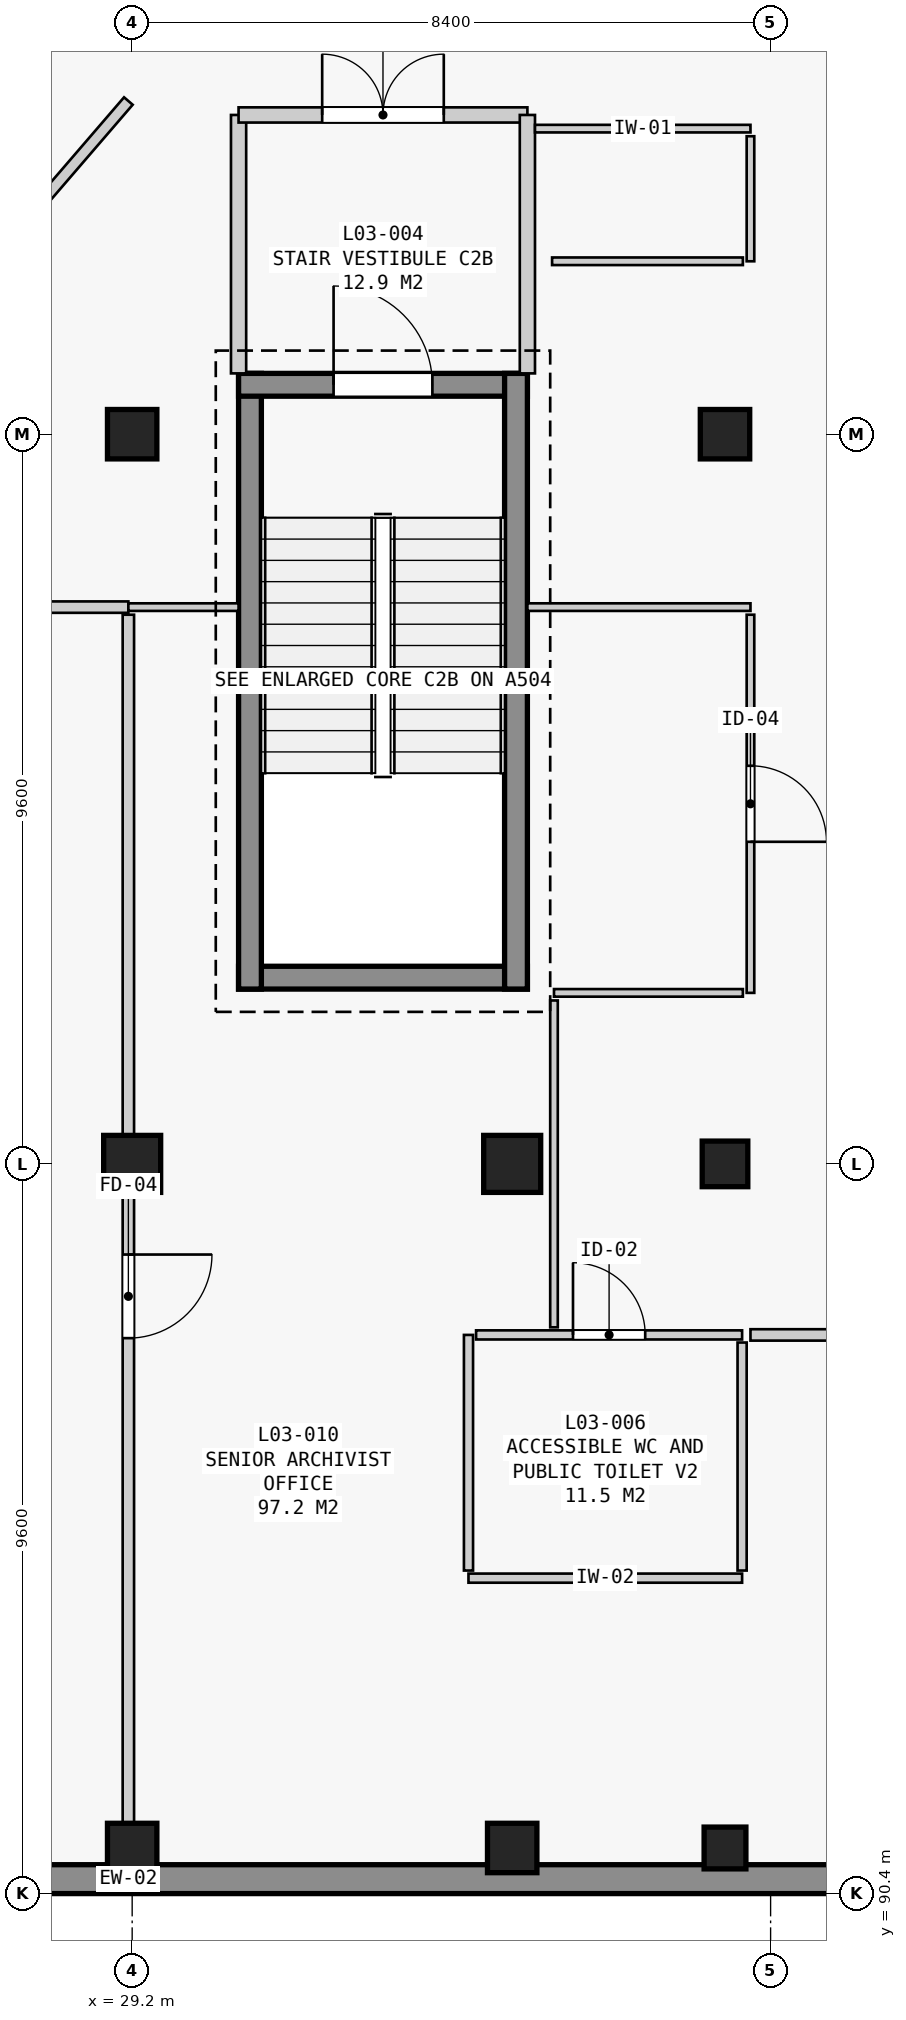
"""IFC4 building model, lengths in metres.
Left out: names, types, materials, properties, quantities, classifications, styles, units other than length and angle.
Written with IfcOpenShell. Run it as: python <this file> out.ifc"""

import sys

from ifc_helpers import new_model, si_unit, direction, frame, frame_2d, origin, origin_2d, place, context, subcontext, project, spatial, rectangle, extrude, element, fill, save


model = new_model("IFC4")
c1 = context("Model", 3, precision=1e-05, world=origin(), true_north=direction((0.0, 1.0)))
c2 = subcontext(c1, "Body", "Model", "MODEL_VIEW")
j1 = project(units=[si_unit("LENGTHUNIT", "METRE"), si_unit("PLANEANGLEUNIT", "RADIAN")], contexts=[c1])
p1 = place(None, origin())
s1 = spatial("IfcSite", under=j1, at=p1, CompositionType="ELEMENT")
p2 = place(p1, origin())
s2 = spatial("IfcBuilding", under=s1, at=p2, CompositionType="ELEMENT")
p3 = place(p2, frame((0.0, 0.0, 13.8)))
s3 = spatial("IfcBuildingStorey", under=s2, at=p3, CompositionType="ELEMENT", Elevation=13.8)
p4 = place(p3, frame((29.2, 91.0, 0.0), z_axis=(0.0, 0.0, 1.0), x_axis=(1.0, 0.0, 0.0)))
e1 = element("IfcColumn", 1, at=p4, inside=s3, PredefinedType="COLUMN", context=c2, shape_type="SweptSolid", body=[
    extrude(rectangle(XDim=0.65, YDim=0.65, at=origin_2d()), origin(), (0.0, 0.0, 1.0), 4.5),
])
p5 = place(p3, frame((29.2, 100.0, 0.0), z_axis=(0.0, 0.0, 1.0), x_axis=(1.0, 0.0, 0.0)))
e2 = element("IfcColumn", 2, at=p5, inside=s3, PredefinedType="COLUMN", context=c2, shape_type="SweptSolid", body=[
    extrude(rectangle(XDim=0.75, YDim=0.75, at=origin_2d()), origin(), (0.0, 0.0, 1.0), 4.5),
])
for number, where, z_axis, x_axis in (
    (3, (29.2, 109.6, 0.0), (0.0, 0.0, 1.0), (1.0, 0.0, 0.0)),
    (4, (34.2, 91.0, 0.0), (0.0, 0.0, 1.0), (1.0, 0.0, 0.0)),
):
    element("IfcColumn", number, at=place(p3, frame(where, z_axis=z_axis, x_axis=x_axis)), inside=s3, PredefinedType="COLUMN", context=c2, shape_type="SweptSolid", body=[
        extrude(rectangle(XDim=0.65, YDim=0.65, at=origin_2d()), origin(), (0.0, 0.0, 1.0), 4.5),
    ])
p6 = place(p3, frame((34.2, 100.0, 0.0), z_axis=(0.0, 0.0, 1.0), x_axis=(1.0, 0.0, 0.0)))
e5 = element("IfcColumn", 5, at=p6, inside=s3, PredefinedType="COLUMN", context=c2, shape_type="SweptSolid", body=[
    extrude(rectangle(XDim=0.75, YDim=0.75, at=origin_2d()), origin(), (0.0, 0.0, 1.0), 4.5),
])
p7 = place(p3, frame((37.0, 91.0, 0.0), z_axis=(0.0, 0.0, 1.0), x_axis=(1.0, 0.0, 0.0)))
e6 = element("IfcColumn", 6, at=p7, inside=s3, PredefinedType="COLUMN", context=c2, shape_type="SweptSolid", body=[
    extrude(rectangle(XDim=0.55, YDim=0.55, at=origin_2d()), origin(), (0.0, 0.0, 1.0), 4.5),
])
p8 = place(p3, frame((37.0, 100.0, 0.0), z_axis=(0.0, 0.0, 1.0), x_axis=(1.0, 0.0, 0.0)))
e7 = element("IfcColumn", 7, at=p8, inside=s3, PredefinedType="COLUMN", context=c2, shape_type="SweptSolid", body=[
    extrude(rectangle(XDim=0.6, YDim=0.6, at=origin_2d()), origin(), (0.0, 0.0, 1.0), 4.5),
])
p9 = place(p3, frame((37.0, 109.6, 0.0), z_axis=(0.0, 0.0, 1.0), x_axis=(1.0, 0.0, 0.0)))
e8 = element("IfcColumn", 8, at=p9, inside=s3, PredefinedType="COLUMN", context=c2, shape_type="SweptSolid", body=[
    extrude(rectangle(XDim=0.65, YDim=0.65, at=origin_2d()), origin(), (0.0, 0.0, 1.0), 4.5),
])
p10 = place(p3, frame((45.71, 90.59, 0.0), z_axis=(0.0, 0.0, 1.0), x_axis=(-1.0, 0.0, 0.0)))
e9 = element("IfcWall", 9, at=p10, inside=s3, PredefinedType="STANDARD", context=c2, shape_type="SweptSolid", body=[
    extrude(rectangle(XDim=33.12, YDim=0.38, at=frame_2d((16.56, 0.0))), origin(), (0.0, 0.0, 1.0), 4.18),
])
p11 = place(p3, frame((34.4, 102.45, 0.0), z_axis=(0.0, 0.0, 1.0), x_axis=(-1.0, 0.0, 0.0)))
e10 = element("IfcWall", 10, at=p11, inside=s3, PredefinedType="SHEAR", context=c2, shape_type="SweptSolid", body=[
    extrude(rectangle(XDim=3.8, YDim=0.3, at=frame_2d((1.9, 0.0))), origin(), (0.0, 0.0, 1.0), 4.18),
])
p12 = place(p3, frame((30.75, 102.3, 0.0), z_axis=(0.0, 0.0, 1.0), x_axis=(0.0, 1.0, 0.0)))
e11 = element("IfcWall", 11, at=p12, inside=s3, PredefinedType="SHEAR", context=c2, shape_type="SweptSolid", body=[
    extrude(rectangle(XDim=8.1, YDim=0.3, at=frame_2d((4.05, 0.0))), origin(), (0.0, 0.0, 1.0), 4.18),
])
p13 = place(p3, frame((30.6, 110.25, 0.0), z_axis=(0.0, 0.0, 1.0), x_axis=(1.0, 0.0, 0.0)))
e12 = element("IfcWall", 12, at=p13, inside=s3, PredefinedType="SHEAR", context=c2, shape_type="SweptSolid", body=[
    extrude(rectangle(XDim=3.8, YDim=0.3, at=frame_2d((1.9, 0.0))), origin(), (0.0, 0.0, 1.0), 4.18),
])
p14 = place(p13, frame((1.25, 0.0, 0.0)))
e13 = element("IfcOpeningElement", 13, at=p14, cuts=e12, PredefinedType="OPENING", context=c2, shape_type="SweptSolid", body=[
    extrude(rectangle(XDim=1.3, YDim=2.2, at=frame_2d((0.65, 1.1))), frame((0.0, 0.16, 0.0), z_axis=(0.0, -1.0, 0.0), x_axis=(1.0, 0.0, 0.0)), (0.0, 0.0, 1.0), 0.32),
])
p15 = place(p3, frame((34.25, 110.4, 0.0), z_axis=(0.0, 0.0, 1.0), x_axis=(0.0, -1.0, 0.0)))
e14 = element("IfcWall", 14, at=p15, inside=s3, PredefinedType="SHEAR", context=c2, shape_type="SweptSolid", body=[
    extrude(rectangle(XDim=8.1, YDim=0.3, at=frame_2d((4.05, 0.0))), origin(), (0.0, 0.0, 1.0), 4.18),
])
p16 = place(p3, frame((30.6, 110.4, 0.0), z_axis=(0.0, 0.0, 1.0), x_axis=(0.0, 1.0, 0.0)))
e15 = element("IfcWall", 15, at=p16, inside=s3, PredefinedType="STANDARD", context=c2, shape_type="SweptSolid", body=[
    extrude(rectangle(XDim=3.4, YDim=0.2, at=frame_2d((1.7, 0.0))), origin(), (0.0, 0.0, 1.0), 4.18),
])
p17 = place(p3, frame((30.6, 113.8, 0.0), z_axis=(0.0, 0.0, 1.0), x_axis=(1.0, 0.0, 0.0)))
e16 = element("IfcWall", 16, at=p17, inside=s3, PredefinedType="STANDARD", context=c2, shape_type="SweptSolid", body=[
    extrude(rectangle(XDim=3.8, YDim=0.2, at=frame_2d((1.9, 0.0))), origin(), (0.0, 0.0, 1.0), 4.18),
])
p18 = place(p17, frame((1.1, 0.0, 0.0)))
e17 = element("IfcOpeningElement", 17, at=p18, cuts=e16, PredefinedType="OPENING", context=c2, shape_type="SweptSolid", body=[
    extrude(rectangle(XDim=1.6, YDim=2.2, at=frame_2d((0.8, 1.1))), frame((0.0, 0.11, 0.0), z_axis=(0.0, -1.0, 0.0), x_axis=(1.0, 0.0, 0.0)), (0.0, 0.0, 1.0), 0.22),
])
p19 = place(p3, frame((34.4, 113.8, 0.0), z_axis=(0.0, 0.0, 1.0), x_axis=(0.0, -1.0, 0.0)))
e18 = element("IfcWall", 18, at=p19, inside=s3, PredefinedType="STANDARD", context=c2, shape_type="SweptSolid", body=[
    extrude(rectangle(XDim=3.4, YDim=0.2, at=frame_2d((1.7, 0.0))), origin(), (0.0, 0.0, 1.0), 4.18),
])
p20 = place(p3, frame((37.225, 94.55, 0.0), z_axis=(0.0, 0.0, 1.0), x_axis=(-1.0, 0.0, 0.0)))
e19 = element("IfcWall", 19, at=p20, inside=s3, PredefinedType="PARTITIONING", context=c2, shape_type="SweptSolid", body=[
    extrude(rectangle(XDim=3.6, YDim=0.12, at=frame_2d((1.8, 0.0))), origin(), (0.0, 0.0, 1.0), 3.36),
])
p21 = place(p3, frame((33.625, 94.65, 0.0), z_axis=(0.0, 0.0, 1.0), x_axis=(0.0, 1.0, 0.0)))
e20 = element("IfcWall", 20, at=p21, inside=s3, PredefinedType="PARTITIONING", context=c2, shape_type="SweptSolid", body=[
    extrude(rectangle(XDim=3.1, YDim=0.12, at=frame_2d((1.55, 0.0))), origin(), (0.0, 0.0, 1.0), 4.18),
])
p22 = place(p3, frame((33.725, 97.75, 0.0), z_axis=(0.0, 0.0, 1.0), x_axis=(1.0, 0.0, 0.0)))
e21 = element("IfcWall", 21, at=p22, inside=s3, PredefinedType="PARTITIONING", context=c2, shape_type="SweptSolid", body=[
    extrude(rectangle(XDim=3.5, YDim=0.12, at=frame_2d((1.75, 0.0))), origin(), (0.0, 0.0, 1.0), 3.36),
])
p23 = place(p22, frame((1.275, 0.0, 0.0)))
e22 = element("IfcOpeningElement", 22, at=p23, cuts=e21, PredefinedType="OPENING", context=c2, shape_type="SweptSolid", body=[
    extrude(rectangle(XDim=0.95, YDim=2.15, at=frame_2d((0.475, 1.075))), frame((0.0, 0.07, 0.0), z_axis=(0.0, -1.0, 0.0), x_axis=(1.0, 0.0, 0.0)), (0.0, 0.0, 1.0), 0.14),
])
p24 = place(p3, frame((37.225, 97.65, 0.0), z_axis=(0.0, 0.0, 1.0), x_axis=(0.0, -1.0, 0.0)))
e23 = element("IfcWall", 23, at=p24, inside=s3, PredefinedType="PARTITIONING", context=c2, shape_type="SweptSolid", body=[
    extrude(rectangle(XDim=3.0, YDim=0.12, at=frame_2d((1.5, 0.0))), origin(), (0.0, 0.0, 1.0), 3.37),
])
p25 = place(p3, frame((27.852, 107.325, 0.0), z_axis=(0.0, 0.0, 1.0), x_axis=(1.0, 0.0, 0.0)))
e24 = element("IfcWall", 24, at=p25, inside=s3, PredefinedType="PARTITIONING", context=c2, shape_type="SweptSolid", body=[
    extrude(rectangle(XDim=1.298, YDim=0.15, at=frame_2d((0.649, 0.0))), origin(), (0.0, 0.0, 1.0), 3.46),
])
p26 = place(p3, frame((29.15, 107.225, 0.0), z_axis=(0.0, 0.0, 1.0), x_axis=(0.0, -1.0, 0.0)))
e25 = element("IfcWall", 25, at=p26, inside=s3, PredefinedType="PARTITIONING", context=c2, shape_type="SweptSolid", body=[
    extrude(rectangle(XDim=16.535, YDim=0.15, at=frame_2d((8.268, 0.0))), origin(), (0.0, 0.0, 1.0), 3.26),
])
p27 = place(p26, frame((8.417, 0.0, 0.0)))
e26 = element("IfcOpeningElement", 26, at=p27, cuts=e25, PredefinedType="OPENING", context=c2, shape_type="SweptSolid", body=[
    extrude(rectangle(XDim=1.1, YDim=2.15, at=frame_2d((0.55, 1.075))), frame((0.0, 0.085, 0.0), z_axis=(0.0, -1.0, 0.0), x_axis=(1.0, 0.0, 0.0)), (0.0, 0.0, 1.0), 0.17),
])
p28 = place(p3, frame((29.15, 113.983, 0.0), z_axis=(0.0, 0.0, 1.0), x_axis=(-0.652340430993, -0.757926092764, 0.0)))
e27 = element("IfcWall", 27, at=p28, inside=s3, PredefinedType="PARTITIONING", context=c2, shape_type="SweptSolid", body=[
    extrude(rectangle(XDim=3.411, YDim=0.15, at=frame_2d((1.705, 0.0))), origin(), (0.0, 0.0, 1.0), 3.41),
])
p29 = place(p3, frame((34.5, 113.62, 0.0), z_axis=(0.0, 0.0, 1.0), x_axis=(1.0, 0.0, 0.0)))
e28 = element("IfcWall", 28, at=p29, inside=s3, PredefinedType="PARTITIONING", context=c2, shape_type="SweptSolid", body=[
    extrude(rectangle(XDim=2.835, YDim=0.1, at=frame_2d((1.417, 0.0))), origin(), (0.0, 0.0, 1.0), 3.37),
])
p30 = place(p3, frame((37.335, 113.52, 0.0), z_axis=(0.0, 0.0, 1.0), x_axis=(0.0, -1.0, 0.0)))
e29 = element("IfcWall", 29, at=p30, inside=s3, PredefinedType="PARTITIONING", context=c2, shape_type="SweptSolid", body=[
    extrude(rectangle(XDim=1.645, YDim=0.1, at=frame_2d((0.823, 0.0))), origin(), (0.0, 0.0, 1.0), 3.37),
])
p31 = place(p3, frame((37.235, 111.875, 0.0), z_axis=(0.0, 0.0, 1.0), x_axis=(-1.0, 0.0, 0.0)))
e30 = element("IfcWall", 30, at=p31, inside=s3, PredefinedType="PARTITIONING", context=c2, shape_type="SweptSolid", body=[
    extrude(rectangle(XDim=2.51, YDim=0.1, at=frame_2d((1.255, 0.0))), origin(), (0.0, 0.0, 1.0), 3.37),
])
p32 = place(p3, frame((34.4, 107.325, 0.0), z_axis=(0.0, 0.0, 1.0), x_axis=(1.0, 0.0, 0.0)))
e31 = element("IfcWall", 31, at=p32, inside=s3, PredefinedType="PARTITIONING", context=c2, shape_type="SweptSolid", body=[
    extrude(rectangle(XDim=2.935, YDim=0.1, at=frame_2d((1.468, 0.0))), origin(), (0.0, 0.0, 1.0), 3.42),
])
p33 = place(p3, frame((37.335, 107.225, 0.0), z_axis=(0.0, 0.0, 1.0), x_axis=(0.0, -1.0, 0.0)))
e32 = element("IfcWall", 32, at=p33, inside=s3, PredefinedType="PARTITIONING", context=c2, shape_type="SweptSolid", body=[
    extrude(rectangle(XDim=4.975, YDim=0.1, at=frame_2d((2.488, 0.0))), origin(), (0.0, 0.0, 1.0), 3.42),
])
p34 = place(p33, frame((1.988, 0.0, 0.0)))
e33 = element("IfcOpeningElement", 33, at=p34, cuts=e32, PredefinedType="OPENING", context=c2, shape_type="SweptSolid", body=[
    extrude(rectangle(XDim=1.0, YDim=2.15, at=frame_2d((0.5, 1.075))), frame((0.0, 0.06, 0.0), z_axis=(0.0, -1.0, 0.0), x_axis=(1.0, 0.0, 0.0)), (0.0, 0.0, 1.0), 0.12),
])
p35 = place(p3, frame((37.235, 102.25, 0.0), z_axis=(0.0, 0.0, 1.0), x_axis=(-1.0, 0.0, 0.0)))
e34 = element("IfcWall", 34, at=p35, inside=s3, PredefinedType="PARTITIONING", context=c2, shape_type="SweptSolid", body=[
    extrude(rectangle(XDim=2.485, YDim=0.1, at=frame_2d((1.243, 0.0))), origin(), (0.0, 0.0, 1.0), 3.42),
])
p36 = place(p3, frame((34.75, 102.15, 0.0), z_axis=(0.0, 0.0, 1.0), x_axis=(0.0, -1.0, 0.0)))
e35 = element("IfcWall", 35, at=p36, inside=s3, PredefinedType="PARTITIONING", context=c2, shape_type="SweptSolid", body=[
    extrude(rectangle(XDim=4.3, YDim=0.1, at=frame_2d((2.15, 0.0))), origin(), (0.0, 0.0, 1.0), 3.31),
])
p37 = place(p3, frame((29.15, 107.325, 0.0), z_axis=(0.0, 0.0, 1.0), x_axis=(1.0, 0.0, 0.0)))
e36 = element("IfcWall", 36, at=p37, inside=s3, PredefinedType="PARTITIONING", context=c2, shape_type="SweptSolid", body=[
    extrude(rectangle(XDim=1.45, YDim=0.1, at=frame_2d((0.725, 0.0))), origin(), (0.0, 0.0, 1.0), 3.46),
])
p38 = place(p3, frame((37.335, 97.75, 0.0), z_axis=(0.0, 0.0, 1.0), x_axis=(1.0, 0.0, 0.0)))
e37 = element("IfcWall", 37, at=p38, inside=s3, PredefinedType="PARTITIONING", context=c2, shape_type="SweptSolid", body=[
    extrude(rectangle(XDim=1.915, YDim=0.15, at=frame_2d((0.958, 0.0))), origin(), (0.0, 0.0, 1.0), 4.18),
])
p39 = place(p14, origin())
e38 = element("IfcDoor", 38, at=p39, inside=s3, OperationType="SINGLE_SWING_LEFT", PredefinedType="DOOR", context=c2, shape_type="SweptSolid", body=[
    extrude(rectangle(XDim=1.3, YDim=2.2, at=frame_2d((0.65, 1.1))), frame((0.0, 0.025, 0.0), z_axis=(0.0, -1.0, 0.0), x_axis=(1.0, 0.0, 0.0)), (0.0, 0.0, 1.0), 0.05),
])
fill(e13, e38)
p40 = place(p18, origin())
e39 = element("IfcDoor", 39, at=p40, inside=s3, OperationType="DOUBLE_DOOR_SINGLE_SWING", PredefinedType="DOOR", context=c2, shape_type="SweptSolid", body=[
    extrude(rectangle(XDim=1.6, YDim=2.2, at=frame_2d((0.8, 1.1))), frame((0.0, 0.025, 0.0), z_axis=(0.0, -1.0, 0.0), x_axis=(1.0, 0.0, 0.0)), (0.0, 0.0, 1.0), 0.05),
])
fill(e17, e39)
p41 = place(p23, origin())
e40 = element("IfcDoor", 40, at=p41, inside=s3, OperationType="SINGLE_SWING_LEFT", PredefinedType="DOOR", context=c2, shape_type="SweptSolid", body=[
    extrude(rectangle(XDim=0.95, YDim=2.15, at=frame_2d((0.475, 1.075))), frame((0.0, 0.025, 0.0), z_axis=(0.0, -1.0, 0.0), x_axis=(1.0, 0.0, 0.0)), (0.0, 0.0, 1.0), 0.05),
])
fill(e22, e40)
p42 = place(p27, origin())
e41 = element("IfcDoor", 41, at=p42, inside=s3, OperationType="SINGLE_SWING_LEFT", PredefinedType="DOOR", context=c2, shape_type="SweptSolid", body=[
    extrude(rectangle(XDim=1.1, YDim=2.15, at=frame_2d((0.55, 1.075))), frame((0.0, 0.025, 0.0), z_axis=(0.0, -1.0, 0.0), x_axis=(1.0, 0.0, 0.0)), (0.0, 0.0, 1.0), 0.05),
])
fill(e26, e41)
p43 = place(p34, origin())
e42 = element("IfcDoor", 42, at=p43, inside=s3, OperationType="SINGLE_SWING_RIGHT", PredefinedType="DOOR", context=c2, shape_type="SweptSolid", body=[
    extrude(rectangle(XDim=1.0, YDim=2.15, at=frame_2d((0.5, 1.075))), frame((0.0, 0.025, 0.0), z_axis=(0.0, -1.0, 0.0), x_axis=(1.0, 0.0, 0.0)), (0.0, 0.0, 1.0), 0.05),
])
fill(e33, e42)
save(model, sys.argv[1])
